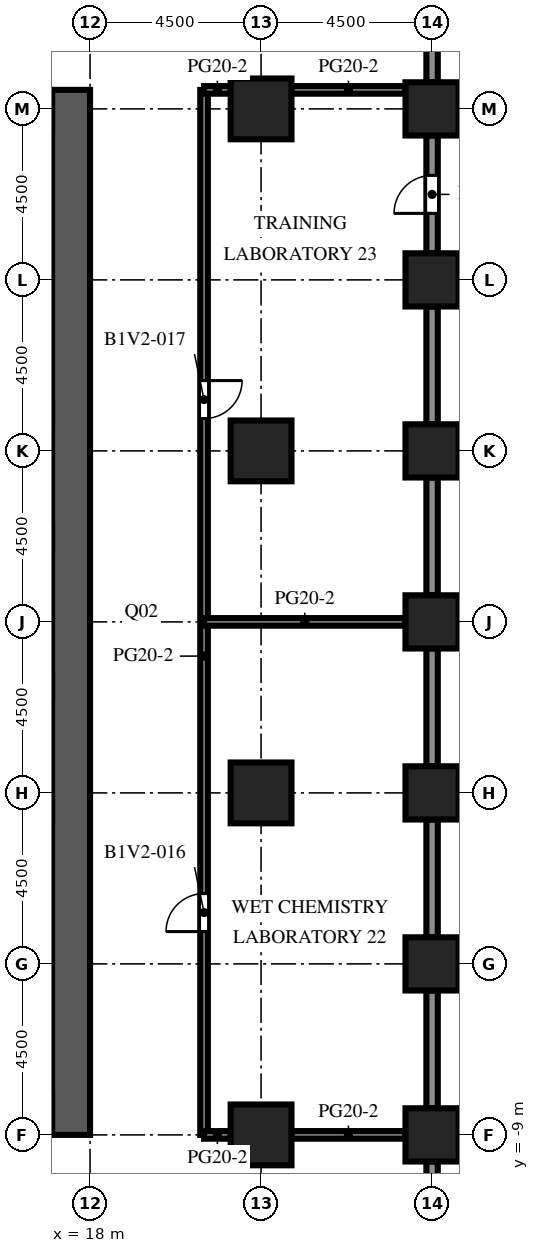
"""IFC4 building model, lengths in metres.
Left out: names, types, materials, properties, quantities, classifications, styles, units other than length and angle.
Written with IfcOpenShell. Run it as: python <this file> out.ifc"""

import sys

from ifc_helpers import new_model, si_unit, direction, frame, frame_2d, origin, origin_2d, place, context, subcontext, project, spatial, rectangle, extrude, element, fill, save


model = new_model("IFC4")
c1 = context("Model", 3, precision=1e-05, world=origin(), true_north=direction((0.0, 1.0)))
c2 = subcontext(c1, "Body", "Model", "MODEL_VIEW")
j1 = project(units=[si_unit("LENGTHUNIT", "METRE"), si_unit("PLANEANGLEUNIT", "RADIAN")], contexts=[c1])
p1 = place(None, origin())
s1 = spatial("IfcSite", under=j1, at=p1, CompositionType="ELEMENT")
p2 = place(p1, origin())
s2 = spatial("IfcBuilding", under=s1, at=p2, CompositionType="ELEMENT")
p3 = place(p2, frame((0.0, 0.0, 31.8)))
s3 = spatial("IfcBuildingStorey", under=s2, at=p3, CompositionType="ELEMENT", Elevation=31.8)
for number, where, z_axis, x_axis in (
    (1, (27.0, -9.0, 0.0), (0.0, 0.0, 1.0), (1.0, 0.0, 0.0)),
    (2, (27.0, -4.5, 0.0), (0.0, 0.0, 1.0), (1.0, 0.0, 0.0)),
    (3, (27.0, 0.0, 0.0), (0.0, 0.0, 1.0), (1.0, 0.0, 0.0)),
    (4, (27.0, 4.5, 0.0), (0.0, 0.0, 1.0), (1.0, 0.0, 0.0)),
    (5, (27.0, 9.0, 0.0), (0.0, 0.0, 1.0), (1.0, 0.0, 0.0)),
    (6, (27.0, 13.5, 0.0), (0.0, 0.0, 1.0), (1.0, 0.0, 0.0)),
    (7, (27.0, 18.0, 0.0), (0.0, 0.0, 1.0), (1.0, 0.0, 0.0)),
):
    element("IfcColumn", number, at=place(p3, frame(where, z_axis=z_axis, x_axis=x_axis)), inside=s3, PredefinedType="COLUMN", context=c2, shape_type="SweptSolid", body=[
        extrude(rectangle(XDim=1.4, YDim=1.4, at=origin_2d()), origin(), (0.0, 0.0, 1.0), 4.1),
    ])
for number, where, z_axis, x_axis in (
    (8, (22.5, -9.0, 0.0), (0.0, 0.0, 1.0), (1.0, 0.0, 0.0)),
    (9, (22.5, 0.0, 0.0), (0.0, 0.0, 1.0), (1.0, 0.0, 0.0)),
    (10, (22.5, 9.0, 0.0), (0.0, 0.0, 1.0), (1.0, 0.0, 0.0)),
    (11, (22.5, 18.0, 0.0), (0.0, 0.0, 1.0), (1.0, 0.0, 0.0)),
):
    element("IfcColumn", number, at=place(p3, frame(where, z_axis=z_axis, x_axis=x_axis)), inside=s3, PredefinedType="COLUMN", context=c2, shape_type="SweptSolid", body=[
        extrude(rectangle(XDim=1.6, YDim=1.6, at=origin_2d()), origin(), (0.0, 0.0, 1.0), 4.1),
    ])
p4 = place(p3, frame((17.5, -9.0, 0.0), z_axis=(0.0, 0.0, 1.0), x_axis=(0.0, 1.0, 0.0)))
e12 = element("IfcWall", 12, at=p4, inside=s3, PredefinedType="SHEAR", context=c2, shape_type="SweptSolid", body=[
    extrude(rectangle(XDim=27.5, YDim=1.0, at=frame_2d((13.75, 0.0))), origin(), (0.0, 0.0, 1.0), 4.1),
])
p5 = place(p4, frame((12.55, 0.0, 0.0)))
e13 = element("IfcOpeningElement", 13, at=p5, cuts=e12, PredefinedType="OPENING", context=c2, shape_type="SweptSolid", body=[
    extrude(rectangle(XDim=2.4, YDim=2.4, at=frame_2d((1.2, 1.2))), frame((0.0, 0.51, 0.0), z_axis=(0.0, -1.0, 0.0), x_axis=(1.0, 0.0, 0.0)), (0.0, 0.0, 1.0), 1.02),
])
p6 = place(p4, frame((6.825, 0.0, 0.0)))
e14 = element("IfcOpeningElement", 14, at=p6, cuts=e12, PredefinedType="OPENING", context=c2, shape_type="SweptSolid", body=[
    extrude(rectangle(XDim=1.2, YDim=2.1, at=frame_2d((0.6, 1.05))), frame((0.0, 0.51, 0.0), z_axis=(0.0, -1.0, 0.0), x_axis=(1.0, 0.0, 0.0)), (0.0, 0.0, 1.0), 1.02),
])
p7 = place(p4, frame((19.475, 0.0, 0.0)))
e15 = element("IfcOpeningElement", 15, at=p7, cuts=e12, PredefinedType="OPENING", context=c2, shape_type="SweptSolid", body=[
    extrude(rectangle(XDim=1.2, YDim=2.1, at=frame_2d((0.6, 1.05))), frame((0.0, 0.51, 0.0), z_axis=(0.0, -1.0, 0.0), x_axis=(1.0, 0.0, 0.0)), (0.0, 0.0, 1.0), 1.02),
])
for number, where, z_axis, x_axis in (
    (16, (27.0, -9.7, 0.0), (0.0, 0.0, 1.0), (0.0, -1.0, 0.0)),
    (17, (27.0, -5.2, 0.0), (0.0, 0.0, 1.0), (0.0, -1.0, 0.0)),
    (18, (27.0, -0.7, 0.0), (0.0, 0.0, 1.0), (0.0, -1.0, 0.0)),
    (19, (27.0, 3.8, 0.0), (0.0, 0.0, 1.0), (0.0, -1.0, 0.0)),
    (20, (27.0, 8.3, 0.0), (0.0, 0.0, 1.0), (0.0, -1.0, 0.0)),
    (21, (27.0, 12.8, 0.0), (0.0, 0.0, 1.0), (0.0, -1.0, 0.0)),
):
    element("IfcWall", number, at=place(p3, frame(where, z_axis=z_axis, x_axis=x_axis)), inside=s3, PredefinedType="SOLIDWALL", context=c2, shape_type="SweptSolid", body=[
        extrude(rectangle(XDim=3.1, YDim=0.3, at=frame_2d((1.55, 0.0))), origin(), (0.0, 0.0, 1.0), 2.6),
    ])
p8 = place(p3, frame((27.0, 17.3, 0.0), z_axis=(0.0, 0.0, 1.0), x_axis=(0.0, -1.0, 0.0)))
e22 = element("IfcWall", 22, at=p8, inside=s3, PredefinedType="SOLIDWALL", context=c2, shape_type="SweptSolid", body=[
    extrude(rectangle(XDim=3.1, YDim=0.3, at=frame_2d((1.55, 0.0))), origin(), (0.0, 0.0, 1.0), 2.6),
])
p9 = place(p8, frame((1.05, 0.0, 0.0)))
e23 = element("IfcOpeningElement", 23, at=p9, cuts=e22, PredefinedType="OPENING", context=c2, shape_type="SweptSolid", body=[
    extrude(rectangle(XDim=1.0, YDim=2.2, at=frame_2d((0.5, 1.1))), frame((0.0, 0.16, 0.0), z_axis=(0.0, -1.0, 0.0), x_axis=(1.0, 0.0, 0.0)), (0.0, 0.0, 1.0), 0.32),
])
p10 = place(p3, frame((27.0, 21.8, 0.0), z_axis=(0.0, 0.0, 1.0), x_axis=(0.0, -1.0, 0.0)))
e24 = element("IfcWall", 24, at=p10, inside=s3, PredefinedType="SOLIDWALL", context=c2, shape_type="SweptSolid", body=[
    extrude(rectangle(XDim=3.1, YDim=0.3, at=frame_2d((1.55, 0.0))), origin(), (0.0, 0.0, 1.0), 2.6),
])
p11 = place(p3, frame((21.0, 18.5, 0.0), z_axis=(0.0, 0.0, 1.0), x_axis=(0.0, -1.0, 0.0)))
e25 = element("IfcWall", 25, at=p11, inside=s3, PredefinedType="PARTITIONING", context=c2, shape_type="SweptSolid", body=[
    extrude(rectangle(XDim=27.5, YDim=0.2, at=frame_2d((13.75, 0.0))), origin(), (0.0, 0.0, 1.0), 3.5),
])
p12 = place(p11, frame((21.15, 0.0, 0.0)))
e26 = element("IfcOpeningElement", 26, at=p12, cuts=e25, PredefinedType="OPENING", context=c2, shape_type="SweptSolid", body=[
    extrude(rectangle(XDim=1.0, YDim=2.1, at=frame_2d((0.5, 1.05))), frame((0.0, 0.11, 0.0), z_axis=(0.0, -1.0, 0.0), x_axis=(1.0, 0.0, 0.0)), (0.0, 0.0, 1.0), 0.22),
])
p13 = place(p11, frame((7.65, 0.0, 0.0)))
e27 = element("IfcOpeningElement", 27, at=p13, cuts=e25, PredefinedType="OPENING", context=c2, shape_type="SweptSolid", body=[
    extrude(rectangle(XDim=1.0, YDim=2.1, at=frame_2d((0.5, 1.05))), frame((0.0, 0.11, 0.0), z_axis=(0.0, -1.0, 0.0), x_axis=(1.0, 0.0, 0.0)), (0.0, 0.0, 1.0), 0.22),
])
p14 = place(p3, frame((21.0, -9.0, 0.0), z_axis=(0.0, 0.0, 1.0), x_axis=(1.0, 0.0, 0.0)))
e28 = element("IfcWall", 28, at=p14, inside=s3, PredefinedType="PARTITIONING", context=c2, shape_type="SweptSolid", body=[
    extrude(rectangle(XDim=0.7, YDim=0.2, at=frame_2d((0.35, 0.0))), origin(), (0.0, 0.0, 1.0), 3.5),
])
p15 = place(p3, frame((23.3, -9.0, 0.0), z_axis=(0.0, 0.0, 1.0), x_axis=(1.0, 0.0, 0.0)))
e29 = element("IfcWall", 29, at=p15, inside=s3, PredefinedType="PARTITIONING", context=c2, shape_type="SweptSolid", body=[
    extrude(rectangle(XDim=3.0, YDim=0.2, at=frame_2d((1.5, 0.0))), origin(), (0.0, 0.0, 1.0), 3.5),
])
p16 = place(p3, frame((21.0, 4.5, 0.0), z_axis=(0.0, 0.0, 1.0), x_axis=(1.0, 0.0, 0.0)))
e30 = element("IfcWall", 30, at=p16, inside=s3, PredefinedType="PARTITIONING", context=c2, shape_type="SweptSolid", body=[
    extrude(rectangle(XDim=5.3, YDim=0.2, at=frame_2d((2.65, 0.0))), origin(), (0.0, 0.0, 1.0), 3.5),
])
p17 = place(p3, frame((21.0, 18.5, 0.0), z_axis=(0.0, 0.0, 1.0), x_axis=(1.0, 0.0, 0.0)))
e31 = element("IfcWall", 31, at=p17, inside=s3, PredefinedType="PARTITIONING", context=c2, shape_type="SweptSolid", body=[
    extrude(rectangle(XDim=0.7, YDim=0.2, at=frame_2d((0.35, 0.0))), origin(), (0.0, 0.0, 1.0), 3.5),
])
p18 = place(p3, frame((23.3, 18.5, 0.0), z_axis=(0.0, 0.0, 1.0), x_axis=(1.0, 0.0, 0.0)))
e32 = element("IfcWall", 32, at=p18, inside=s3, PredefinedType="PARTITIONING", context=c2, shape_type="SweptSolid", body=[
    extrude(rectangle(XDim=3.0, YDim=0.2, at=frame_2d((1.5, 0.0))), origin(), (0.0, 0.0, 1.0), 3.5),
])
p19 = place(p9, origin())
e33 = element("IfcDoor", 33, at=p19, inside=s3, OperationType="SINGLE_SWING_RIGHT", PredefinedType="DOOR", context=c2, shape_type="SweptSolid", body=[
    extrude(rectangle(XDim=1.0, YDim=2.2, at=frame_2d((0.5, 1.1))), frame((0.0, 0.025, 0.0), z_axis=(0.0, -1.0, 0.0), x_axis=(1.0, 0.0, 0.0)), (0.0, 0.0, 1.0), 0.05),
])
fill(e23, e33)
p20 = place(p5, origin())
e34 = element("IfcDoor", 34, at=p20, inside=s3, OperationType="DOUBLE_DOOR_DOUBLE_SWING", PredefinedType="DOOR", context=c2, shape_type="SweptSolid", body=[
    extrude(rectangle(XDim=2.4, YDim=2.4, at=frame_2d((1.2, 1.2))), frame((0.0, 0.025, 0.0), z_axis=(0.0, -1.0, 0.0), x_axis=(1.0, 0.0, 0.0)), (0.0, 0.0, 1.0), 0.05),
])
fill(e13, e34)
p21 = place(p6, frame((1.2, 0.0, 0.0), z_axis=(0.0, 0.0, 1.0), x_axis=(-1.0, 0.0, 0.0)))
e35 = element("IfcDoor", 35, at=p21, inside=s3, OperationType="SINGLE_SWING_LEFT", PredefinedType="DOOR", context=c2, shape_type="SweptSolid", body=[
    extrude(rectangle(XDim=1.2, YDim=2.1, at=frame_2d((0.6, 1.05))), frame((0.0, 0.025, 0.0), z_axis=(0.0, -1.0, 0.0), x_axis=(1.0, 0.0, 0.0)), (0.0, 0.0, 1.0), 0.05),
])
fill(e14, e35)
p22 = place(p7, frame((1.2, 0.0, 0.0), z_axis=(0.0, 0.0, 1.0), x_axis=(-1.0, 0.0, 0.0)))
e36 = element("IfcDoor", 36, at=p22, inside=s3, OperationType="SINGLE_SWING_LEFT", PredefinedType="DOOR", context=c2, shape_type="SweptSolid", body=[
    extrude(rectangle(XDim=1.2, YDim=2.1, at=frame_2d((0.6, 1.05))), frame((0.0, 0.025, 0.0), z_axis=(0.0, -1.0, 0.0), x_axis=(1.0, 0.0, 0.0)), (0.0, 0.0, 1.0), 0.05),
])
fill(e15, e36)
p23 = place(p12, origin())
e37 = element("IfcDoor", 37, at=p23, inside=s3, OperationType="SINGLE_SWING_RIGHT", PredefinedType="DOOR", context=c2, shape_type="SweptSolid", body=[
    extrude(rectangle(XDim=1.0, YDim=2.1, at=frame_2d((0.5, 1.05))), frame((0.0, 0.025, 0.0), z_axis=(0.0, -1.0, 0.0), x_axis=(1.0, 0.0, 0.0)), (0.0, 0.0, 1.0), 0.05),
])
fill(e26, e37)
p24 = place(p13, origin())
e38 = element("IfcDoor", 38, at=p24, inside=s3, OperationType="SINGLE_SWING_LEFT", PredefinedType="DOOR", context=c2, shape_type="SweptSolid", body=[
    extrude(rectangle(XDim=1.0, YDim=2.1, at=frame_2d((0.5, 1.05))), frame((0.0, 0.025, 0.0), z_axis=(0.0, -1.0, 0.0), x_axis=(1.0, 0.0, 0.0)), (0.0, 0.0, 1.0), 0.05),
])
fill(e27, e38)
save(model, sys.argv[1])
